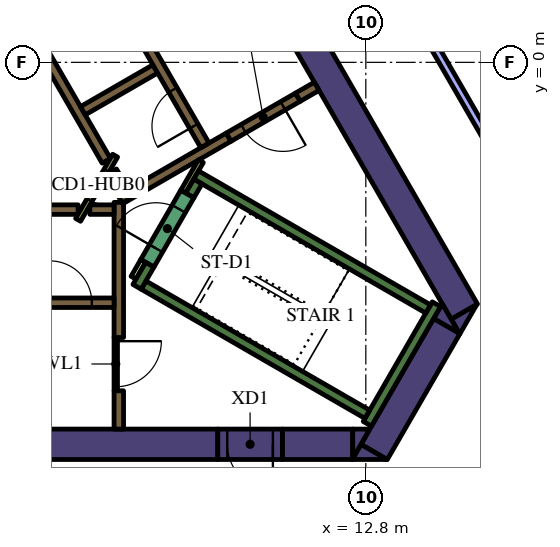
"""IFC4 building model, lengths in metres.
Left out: names, types, materials, properties, quantities, classifications, styles, units other than length and angle.
Written with IfcOpenShell. Run it as: python <this file> out.ifc"""

import sys

from ifc_helpers import new_model, si_unit, direction, frame, frame_2d, origin, place, context, subcontext, project, spatial, polyline, rectangle, outline, extrude, element, fill, save


model = new_model("IFC4")
c1 = context("Model", 3, precision=1e-05, world=origin(), true_north=direction((0.0, 1.0)))
c2 = subcontext(c1, "Body", "Model", "MODEL_VIEW")
j1 = project(units=[si_unit("LENGTHUNIT", "METRE"), si_unit("PLANEANGLEUNIT", "RADIAN")], contexts=[c1])
p1 = place(None, origin())
s1 = spatial("IfcSite", under=j1, at=p1, CompositionType="ELEMENT")
p2 = place(p1, origin())
s2 = spatial("IfcBuilding", under=s1, at=p2, CompositionType="ELEMENT")
p3 = place(p2, frame((0.0, 0.0, 192.0)))
s3 = spatial("IfcBuildingStorey", under=s2, at=p3, CompositionType="ELEMENT", Elevation=192.0)
p4 = place(p3, frame((9.129, 4.289, 0.0), z_axis=(0.0, 0.0, 1.0), x_axis=(0.499995742806, -0.866027861663, 0.0)))
e1 = element("IfcWall", 1, at=p4, inside=s3, PredefinedType="SOLIDWALL", context=c2, shape_type="SweptSolid", body=[
    extrude(rectangle(XDim=12.527, YDim=0.8, at=frame_2d((6.264, 0.0))), origin(), (0.0, 0.0, 1.0), 4.2),
])
p5 = place(p3, origin())
e2 = element("IfcWall", 2, at=p5, inside=s3, PredefinedType="SOLIDWALL", context=c2, shape_type="SweptSolid", body=[
    extrude(outline(polyline([(15.271, -7.15), (15.047, -6.762), (15.719, -6.374), (15.271, -7.15)])), origin(), (0.0, 0.0, 1.0), 4.2),
])
p6 = place(p3, frame((13.018, -10.252, 0.0), z_axis=(0.0, 0.0, 1.0), x_axis=(0.499984020225, 0.866034629516, 0.0)))
e3 = element("IfcWall", 3, at=p6, inside=s3, PredefinedType="SOLIDWALL", context=c2, shape_type="SweptSolid", body=[
    extrude(rectangle(XDim=3.824, YDim=0.8, at=frame_2d((1.912, 0.0))), origin(), (0.0, 0.0, 1.0), 4.2),
])
e4 = element("IfcWall", 4, at=p5, inside=s3, PredefinedType="SOLIDWALL", context=c2, shape_type="SweptSolid", body=[
    extrude(outline(polyline([(12.442, -10.45), (12.671, -10.053), (13.358, -10.45), (12.442, -10.45)])), origin(), (0.0, 0.0, 1.0), 4.2),
])
e5 = element("IfcWall", 5, at=p5, inside=s3, PredefinedType="SOLIDWALL", context=c2, shape_type="SweptSolid", body=[
    extrude(outline(polyline([(14.809, -6.35), (15.257, -7.126), (14.585, -6.738), (14.809, -6.35)])), origin(), (0.0, 0.0, 1.0), 4.2),
])
p7 = place(p3, frame((10.604, -10.05, 0.0), z_axis=(0.0, 0.0, 1.0), x_axis=(1.0, 0.0, 0.0)))
e6 = element("IfcWall", 6, at=p7, inside=s3, PredefinedType="SOLIDWALL", context=c2, shape_type="SweptSolid", body=[
    extrude(rectangle(XDim=1.849, YDim=0.8, at=frame_2d((0.925, 0.0))), origin(), (0.0, 0.0, 1.0), 4.2),
])
e7 = element("IfcWall", 7, at=p5, inside=s3, PredefinedType="SOLIDWALL", context=c2, shape_type="SweptSolid", body=[
    extrude(outline(polyline([(12.904, -9.65), (12.456, -10.426), (12.456, -9.65), (12.904, -9.65)])), origin(), (0.0, 0.0, 1.0), 4.2),
])
p8 = place(p3, frame((-13.378, -10.05, 0.0), z_axis=(0.0, 0.0, 1.0), x_axis=(1.0, 0.0, 0.0)))
e8 = element("IfcWall", 8, at=p8, inside=s3, PredefinedType="SOLIDWALL", context=c2, shape_type="SweptSolid", body=[
    extrude(rectangle(XDim=22.282, YDim=0.8, at=frame_2d((11.141, 0.0))), origin(), (0.0, 0.0, 1.0), 4.2),
])
p9 = place(p3, frame((12.84, -9.511, 0.0), z_axis=(0.0, 0.0, 1.0), x_axis=(0.499997733992, 0.866026712061, 0.0)))
e9 = element("IfcWall", 9, at=p9, inside=s3, PredefinedType="SOLIDWALL", context=c2, shape_type="SweptSolid", body=[
    extrude(rectangle(XDim=3.634, YDim=0.25, at=frame_2d((1.817, 0.0))), origin(), (0.0, 0.0, 1.0), 4.2),
])
p10 = place(p3, frame((12.84, -9.261, 0.0), z_axis=(0.0, 0.0, 1.0), x_axis=(-0.866013990052, 0.500019768644, 0.0)))
e10 = element("IfcWall", 10, at=p10, inside=s3, PredefinedType="SOLIDWALL", context=c2, shape_type="SweptSolid", body=[
    extrude(rectangle(XDim=6.8, YDim=0.25, at=frame_2d((3.4, 0.0))), origin(), (0.0, 0.0, 1.0), 4.2),
])
p11 = place(p3, frame((6.78, -5.906, 0.0), z_axis=(0.0, 0.0, 1.0), x_axis=(0.500223362819, 0.865896406789, 0.0)))
e11 = element("IfcWall", 11, at=p11, inside=s3, PredefinedType="SOLIDWALL", context=c2, shape_type="SweptSolid", body=[
    extrude(rectangle(XDim=0.675, YDim=0.25, at=frame_2d((0.337, 0.0))), origin(), (0.0, 0.0, 1.0), 4.2),
])
p12 = place(p3, frame((8.334, -2.964, 0.0), z_axis=(0.0, 0.0, 1.0), x_axis=(0.866016039709, -0.500016218704, 0.0)))
e12 = element("IfcWall", 12, at=p12, inside=s3, PredefinedType="SOLIDWALL", context=c2, shape_type="SweptSolid", body=[
    extrude(rectangle(XDim=7.05, YDim=0.25, at=frame_2d((3.525, 0.0))), origin(), (0.0, 0.0, 1.0), 4.2),
])
p13 = place(p3, frame((8.168, -3.503, 0.0), z_axis=(0.0, 0.0, 1.0), x_axis=(0.49972245349, 0.866185586049, 0.0)))
e13 = element("IfcWall", 13, at=p13, inside=s3, PredefinedType="SOLIDWALL", context=c2, shape_type="SweptSolid", body=[
    extrude(rectangle(XDim=0.425, YDim=0.25, at=frame_2d((0.212, 0.0))), origin(), (0.0, 0.0, 1.0), 4.2),
])
p14 = place(p3, frame((-5.259, -3.875, 0.0), z_axis=(0.0, 0.0, 1.0), x_axis=(1.0, 0.0, 0.0)))
e14 = element("IfcWall", 14, at=p14, inside=s3, PredefinedType="SOLIDWALL", context=c2, shape_type="SweptSolid", body=[
    extrude(rectangle(XDim=10.489, YDim=0.25, at=frame_2d((5.244, 0.0))), origin(), (0.0, 0.0, 1.0), 4.2),
])
p15 = place(p3, frame((6.3, -7.24, 0.0), z_axis=(0.0, 0.0, 1.0), x_axis=(0.0, 1.0, 0.0)))
e15 = element("IfcWall", 15, at=p15, inside=s3, PredefinedType="SOLIDWALL", context=c2, shape_type="SweptSolid", body=[
    extrude(rectangle(XDim=3.556, YDim=0.25, at=frame_2d((1.778, 0.0))), origin(), (0.0, 0.0, 1.0), 4.2),
])
p16 = place(p3, frame((6.3, -9.65, 0.0), z_axis=(0.0, 0.0, 1.0), x_axis=(0.0, 1.0, 0.0)))
e16 = element("IfcWall", 16, at=p16, inside=s3, PredefinedType="SOLIDWALL", context=c2, shape_type="SweptSolid", body=[
    extrude(rectangle(XDim=1.008, YDim=0.25, at=frame_2d((0.504, 0.0))), origin(), (0.0, 0.0, 1.0), 4.2),
])
p17 = place(p3, frame((5.538, -3.875, 0.0), z_axis=(0.0, 0.0, 1.0), x_axis=(1.0, 0.0, 0.0)))
e17 = element("IfcWall", 17, at=p17, inside=s3, PredefinedType="SOLIDWALL", context=c2, shape_type="SweptSolid", body=[
    extrude(rectangle(XDim=0.637, YDim=0.25, at=frame_2d((0.318, 0.0))), origin(), (0.0, 0.0, 1.0), 4.2),
])
p18 = place(p3, frame((9.19, -1.969, 0.0), z_axis=(0.0, 0.0, 1.0), x_axis=(-0.866057109641, -0.499945079824, 0.0)))
e18 = element("IfcWall", 18, at=p18, inside=s3, PredefinedType="SOLIDWALL", context=c2, shape_type="SweptSolid", body=[
    extrude(rectangle(XDim=3.291, YDim=0.25, at=frame_2d((1.646, 0.0))), origin(), (0.0, 0.0, 1.0), 4.2),
])
p19 = place(p3, frame((6.13, -2.867, 0.0), z_axis=(0.0, 0.0, 1.0), x_axis=(0.500160776593, -0.865932559475, 0.0)))
e19 = element("IfcWall", 19, at=p19, inside=s3, PredefinedType="SOLIDWALL", context=c2, shape_type="SweptSolid", body=[
    extrude(rectangle(XDim=0.627, YDim=0.25, at=frame_2d((0.313, 0.0))), origin(), (0.0, 0.0, 1.0), 4.2),
])
p20 = place(p3, frame((11.507, -0.631, 0.0), z_axis=(0.0, 0.0, 1.0), x_axis=(-0.866093731455, -0.499881634324, 0.0)))
e20 = element("IfcWall", 20, at=p20, inside=s3, PredefinedType="SOLIDWALL", context=c2, shape_type="SweptSolid", body=[
    extrude(rectangle(XDim=0.575, YDim=0.25, at=frame_2d((0.288, 0.0))), origin(), (0.0, 0.0, 1.0), 4.2),
])
p21 = place(p3, frame((5.97, -2.591, 0.0), z_axis=(0.0, 0.0, 1.0), x_axis=(-0.499994469932, 0.866028596547, 0.0)))
e21 = element("IfcWall", 21, at=p21, inside=s3, PredefinedType="SOLIDWALL", context=c2, shape_type="SweptSolid", body=[
    extrude(rectangle(XDim=10.488, YDim=0.25, at=frame_2d((5.244, 0.0))), origin(), (0.0, 0.0, 1.0), 4.2),
])
p22 = place(p3, frame((5.354, -1.274, 0.0), z_axis=(0.0, 0.0, 1.0), x_axis=(0.866008176907, 0.50002983664, 0.0)))
e22 = element("IfcWall", 22, at=p22, inside=s3, PredefinedType="SOLIDWALL", context=c2, shape_type="SweptSolid", body=[
    extrude(rectangle(XDim=2.2, YDim=0.25, at=frame_2d((1.1, 0.0))), origin(), (0.0, 0.0, 1.0), 4.2),
])
p23 = place(p3, frame((6.945, -5.222, 0.0), z_axis=(0.0, 0.0, 1.0), x_axis=(-0.499818422106, -0.866130212453, 0.0)))
e23 = element("IfcWall", 23, at=p23, inside=s3, PredefinedType="PARTITIONING", context=c2, shape_type="SweptSolid", body=[
    extrude(rectangle(XDim=0.514, YDim=0.15, at=frame_2d((0.257, 0.0))), origin(), (0.0, 0.0, 1.0), 3.1),
])
p24 = place(p3, frame((8.459, -2.599, 0.0), z_axis=(0.0, 0.0, 1.0), x_axis=(-0.500041054325, -0.866001699761, 0.0)))
e24 = element("IfcWall", 24, at=p24, inside=s3, PredefinedType="PARTITIONING", context=c2, shape_type="SweptSolid", body=[
    extrude(rectangle(XDim=0.929, YDim=0.15, at=frame_2d((0.464, 0.0))), origin(), (0.0, 0.0, 1.0), 4.2),
])
p25 = place(p3, frame((-6.175, -6.325, 0.0), z_axis=(0.0, 0.0, 1.0), x_axis=(1.0, 0.0, 0.0)))
e25 = element("IfcWall", 25, at=p25, inside=s3, PredefinedType="SOLIDWALL", context=c2, shape_type="SweptSolid", body=[
    extrude(rectangle(XDim=12.35, YDim=0.25, at=frame_2d((6.175, 0.0))), origin(), (0.0, 0.0, 1.0), 4.2),
])
p26 = place(p25, frame((0.585, 0.0, 0.0)))
e26 = element("IfcOpeningElement", 26, at=p26, cuts=e25, PredefinedType="OPENING", context=c2, shape_type="SweptSolid", body=[
    extrude(rectangle(XDim=1.1, YDim=2.1, at=frame_2d((0.55, 1.05))), frame((0.0, 0.135, 0.0), z_axis=(0.0, -1.0, 0.0), x_axis=(1.0, 0.0, 0.0)), (0.0, 0.0, 1.0), 0.27),
])
p27 = place(p25, frame((3.105, 0.0, 0.0)))
e27 = element("IfcOpeningElement", 27, at=p27, cuts=e25, PredefinedType="OPENING", context=c2, shape_type="SweptSolid", body=[
    extrude(rectangle(XDim=1.1, YDim=2.1, at=frame_2d((0.55, 1.05))), frame((0.0, 0.135, 0.0), z_axis=(0.0, -1.0, 0.0), x_axis=(1.0, 0.0, 0.0)), (0.0, 0.0, 1.0), 0.27),
])
p28 = place(p25, frame((5.625, 0.0, 0.0)))
e28 = element("IfcOpeningElement", 28, at=p28, cuts=e25, PredefinedType="OPENING", context=c2, shape_type="SweptSolid", body=[
    extrude(rectangle(XDim=1.1, YDim=2.1, at=frame_2d((0.55, 1.05))), frame((0.0, 0.135, 0.0), z_axis=(0.0, -1.0, 0.0), x_axis=(1.0, 0.0, 0.0)), (0.0, 0.0, 1.0), 0.27),
])
p29 = place(p25, frame((8.145, 0.0, 0.0)))
e29 = element("IfcOpeningElement", 29, at=p29, cuts=e25, PredefinedType="OPENING", context=c2, shape_type="SweptSolid", body=[
    extrude(rectangle(XDim=1.1, YDim=2.1, at=frame_2d((0.55, 1.05))), frame((0.0, 0.135, 0.0), z_axis=(0.0, -1.0, 0.0), x_axis=(1.0, 0.0, 0.0)), (0.0, 0.0, 1.0), 0.27),
])
p30 = place(p25, frame((10.665, 0.0, 0.0)))
e30 = element("IfcOpeningElement", 30, at=p30, cuts=e25, PredefinedType="OPENING", context=c2, shape_type="SweptSolid", body=[
    extrude(rectangle(XDim=1.1, YDim=2.1, at=frame_2d((0.55, 1.05))), frame((0.0, 0.135, 0.0), z_axis=(0.0, -1.0, 0.0), x_axis=(1.0, 0.0, 0.0)), (0.0, 0.0, 1.0), 0.27),
])
p31 = place(p3, frame((8.565, -2.185, 0.0), z_axis=(0.0, 0.0, 1.0), x_axis=(-0.499997954832, 0.866026584559, 0.0)))
e31 = element("IfcWall", 31, at=p31, inside=s3, PredefinedType="SOLIDWALL", context=c2, shape_type="SweptSolid", body=[
    extrude(rectangle(XDim=12.35, YDim=0.25, at=frame_2d((6.175, 0.0))), origin(), (0.0, 0.0, 1.0), 4.2),
])
p32 = place(p31, frame((0.585, 0.0, 0.0)))
e32 = element("IfcOpeningElement", 32, at=p32, cuts=e31, PredefinedType="OPENING", context=c2, shape_type="SweptSolid", body=[
    extrude(rectangle(XDim=1.1, YDim=2.1, at=frame_2d((0.55, 1.05))), frame((0.0, 0.135, 0.0), z_axis=(0.0, -1.0, 0.0), x_axis=(1.0, 0.0, 0.0)), (0.0, 0.0, 1.0), 0.27),
])
p33 = place(p3, frame((7.053, -5.284, 0.0), z_axis=(0.0, 0.0, 1.0), x_axis=(0.500078061341, 0.865980330357, 0.0)))
e33 = element("IfcWall", 33, at=p33, inside=s3, PredefinedType="SOLIDWALL", context=c2, shape_type="SweptSolid", body=[
    extrude(rectangle(XDim=2.1, YDim=0.4, at=frame_2d((1.05, 0.0))), origin(), (0.0, 0.0, 1.0), 4.2),
])
p34 = place(p33, frame((0.45, 0.0, 0.0)))
e34 = element("IfcOpeningElement", 34, at=p34, cuts=e33, PredefinedType="OPENING", context=c2, shape_type="SweptSolid", body=[
    extrude(rectangle(XDim=1.2, YDim=2.1, at=frame_2d((0.6, 1.05))), frame((0.0, 0.21, 0.0), z_axis=(0.0, -1.0, 0.0), x_axis=(1.0, 0.0, 0.0)), (0.0, 0.0, 1.0), 0.42),
])
p35 = place(p3, frame((6.203, -2.456, 0.0), z_axis=(0.0, 0.0, 1.0), x_axis=(-0.500043961785, -0.866000020948, 0.0)))
e35 = element("IfcWall", 35, at=p35, inside=s3, PredefinedType="PARTITIONING", context=c2, shape_type="SweptSolid", body=[
    extrude(rectangle(XDim=1.95, YDim=0.15, at=frame_2d((0.975, 0.0))), origin(), (0.0, 0.0, 1.0), 4.2),
])
p36 = place(p35, frame((0.45, 0.0, 0.0)))
e36 = element("IfcOpeningElement", 36, at=p36, cuts=e35, PredefinedType="OPENING", context=c2, shape_type="SweptSolid", body=[
    extrude(rectangle(XDim=0.9, YDim=2.1, at=frame_2d((0.45, 1.05))), frame((0.0, 0.085, 0.0), z_axis=(0.0, -1.0, 0.0), x_axis=(1.0, 0.0, 0.0)), (0.0, 0.0, 1.0), 0.17),
])
p37 = place(p3, frame((6.22, -7.237, 0.0), z_axis=(0.0, 0.0, 1.0), x_axis=(0.0, -1.0, 0.0)))
e37 = element("IfcWall", 37, at=p37, inside=s3, PredefinedType="PARTITIONING", context=c2, shape_type="SweptSolid", body=[
    extrude(rectangle(XDim=1.4, YDim=0.09, at=frame_2d((0.7, 0.0))), origin(), (0.0, 0.0, 1.0), 3.1),
])
p38 = place(p37, frame((0.1, 0.0, 0.0)))
e38 = element("IfcOpeningElement", 38, at=p38, cuts=e37, PredefinedType="OPENING", context=c2, shape_type="SweptSolid", body=[
    extrude(rectangle(XDim=1.2, YDim=2.1, at=frame_2d((0.6, 1.05))), frame((0.0, 0.055, 0.0), z_axis=(0.0, -1.0, 0.0), x_axis=(1.0, 0.0, 0.0)), (0.0, 0.0, 1.0), 0.11),
])
p39 = place(p3, frame((11.009, -0.919, 0.0), z_axis=(0.0, 0.0, 1.0), x_axis=(-0.866059744384, -0.49994051562, 0.0)))
e39 = element("IfcWall", 39, at=p39, inside=s3, PredefinedType="SOLIDWALL", context=c2, shape_type="SweptSolid", body=[
    extrude(rectangle(XDim=2.1, YDim=0.25, at=frame_2d((1.05, 0.0))), origin(), (0.0, 0.0, 1.0), 4.2),
])
p40 = place(p39, frame((0.45, 0.0, 0.0)))
e40 = element("IfcOpeningElement", 40, at=p40, cuts=e39, PredefinedType="OPENING", context=c2, shape_type="SweptSolid", body=[
    extrude(rectangle(XDim=1.2, YDim=2.1, at=frame_2d((0.6, 1.05))), frame((0.0, 0.135, 0.0), z_axis=(0.0, -1.0, 0.0), x_axis=(1.0, 0.0, 0.0)), (0.0, 0.0, 1.0), 0.27),
])
p41 = place(p3, frame((10.604, -10.05, 0.0), z_axis=(0.0, 0.0, 1.0), x_axis=(-1.0, 0.0, 0.0)))
e41 = element("IfcWall", 41, at=p41, inside=s3, PredefinedType="SOLIDWALL", context=c2, shape_type="SweptSolid", body=[
    extrude(rectangle(XDim=1.7, YDim=0.8, at=frame_2d((0.85, 0.0))), origin(), (0.0, 0.0, 1.0), 4.2),
])
p42 = place(p41, frame((0.25, 0.0, 0.0)))
e42 = element("IfcOpeningElement", 42, at=p42, cuts=e41, PredefinedType="OPENING", context=c2, shape_type="SweptSolid", body=[
    extrude(rectangle(XDim=1.2, YDim=2.1, at=frame_2d((0.6, 1.05))), frame((0.0, 0.41, 0.0), z_axis=(0.0, -1.0, 0.0), x_axis=(1.0, 0.0, 0.0)), (0.0, 0.0, 1.0), 0.82),
])
p43 = place(p3, frame((14.766, -12.824, 0.0), z_axis=(0.0, 0.0, 1.0), x_axis=(0.499983176524, 0.866035116605, 0.0)))
e43 = element("IfcWall", 43, at=p43, inside=s3, PredefinedType="PARTITIONING", context=c2, shape_type="SweptSolid", body=[
    extrude(rectangle(XDim=3.648, YDim=0.2, at=frame_2d((1.824, 0.0))), origin(), (0.0, 0.0, 1.0), 3.1),
])
p44 = place(p3, frame((15.219, 5.177, 0.0), z_axis=(0.0, 0.0, 1.0), x_axis=(0.472318506028, -0.881427948765, 0.0)))
e44 = element("IfcWall", 44, at=p44, inside=s3, PredefinedType="PARTITIONING", context=c2, shape_type="SweptSolid", body=[
    extrude(rectangle(XDim=6.419, YDim=0.15, at=frame_2d((3.21, 0.0))), origin(), (0.0, 0.0, 1.0), 3.1),
])
p45 = place(p44, frame((2.719, 0.0, 0.0)))
e45 = element("IfcOpeningElement", 45, at=p45, cuts=e44, PredefinedType="OPENING", context=c2, shape_type="SweptSolid", body=[
    extrude(rectangle(XDim=0.9, YDim=2.1, at=frame_2d((0.45, 1.05))), frame((0.0, 0.085, 0.0), z_axis=(0.0, -1.0, 0.0), x_axis=(1.0, 0.0, 0.0)), (0.0, 0.0, 1.0), 0.17),
])
p46 = place(p3, frame((18.489, -6.324, 0.0), z_axis=(0.0, 0.0, 1.0), x_axis=(-0.500006134913, 0.866021861762, 0.0)))
e46 = element("IfcWall", 46, at=p46, inside=s3, PredefinedType="PARTITIONING", context=c2, shape_type="SweptSolid", body=[
    extrude(rectangle(XDim=8.691, YDim=0.2, at=frame_2d((4.346, 0.0))), origin(), (0.0, 0.0, 1.0), 3.1),
])
p47 = place(p30, origin())
e47 = element("IfcDoor", 47, at=p47, inside=s3, OperationType="DOUBLE_DOOR_SLIDING", PredefinedType="DOOR", context=c2, shape_type="SweptSolid", body=[
    extrude(rectangle(XDim=1.1, YDim=2.1, at=frame_2d((0.55, 1.05))), frame((0.0, 0.025, 0.0), z_axis=(0.0, -1.0, 0.0), x_axis=(1.0, 0.0, 0.0)), (0.0, 0.0, 1.0), 0.05),
])
fill(e30, e47)
p48 = place(p32, origin())
e48 = element("IfcDoor", 48, at=p48, inside=s3, OperationType="DOUBLE_DOOR_SLIDING", PredefinedType="DOOR", context=c2, shape_type="SweptSolid", body=[
    extrude(rectangle(XDim=1.1, YDim=2.1, at=frame_2d((0.55, 1.05))), frame((0.0, 0.025, 0.0), z_axis=(0.0, -1.0, 0.0), x_axis=(1.0, 0.0, 0.0)), (0.0, 0.0, 1.0), 0.05),
])
fill(e32, e48)
p49 = place(p34, origin())
e49 = element("IfcDoor", 49, at=p49, inside=s3, OperationType="SINGLE_SWING_LEFT", PredefinedType="DOOR", context=c2, shape_type="SweptSolid", body=[
    extrude(rectangle(XDim=1.2, YDim=2.1, at=frame_2d((0.6, 1.05))), frame((0.0, 0.025, 0.0), z_axis=(0.0, -1.0, 0.0), x_axis=(1.0, 0.0, 0.0)), (0.0, 0.0, 1.0), 0.05),
])
fill(e34, e49)
p50 = place(p36, origin())
e50 = element("IfcDoor", 50, at=p50, inside=s3, OperationType="SINGLE_SWING_LEFT", PredefinedType="DOOR", context=c2, shape_type="SweptSolid", body=[
    extrude(rectangle(XDim=0.9, YDim=2.1, at=frame_2d((0.45, 1.05))), frame((0.0, 0.025, 0.0), z_axis=(0.0, -1.0, 0.0), x_axis=(1.0, 0.0, 0.0)), (0.0, 0.0, 1.0), 0.05),
])
fill(e36, e50)
p51 = place(p38, origin())
e51 = element("IfcDoor", 51, at=p51, inside=s3, OperationType="SINGLE_SWING_LEFT", PredefinedType="DOOR", context=c2, shape_type="SweptSolid", body=[
    extrude(rectangle(XDim=1.2, YDim=2.1, at=frame_2d((0.6, 1.05))), frame((0.0, 0.025, 0.0), z_axis=(0.0, -1.0, 0.0), x_axis=(1.0, 0.0, 0.0)), (0.0, 0.0, 1.0), 0.05),
])
fill(e38, e51)
p52 = place(p40, origin())
e52 = element("IfcDoor", 52, at=p52, inside=s3, OperationType="SINGLE_SWING_LEFT", PredefinedType="DOOR", context=c2, shape_type="SweptSolid", body=[
    extrude(rectangle(XDim=1.2, YDim=2.1, at=frame_2d((0.6, 1.05))), frame((0.0, 0.025, 0.0), z_axis=(0.0, -1.0, 0.0), x_axis=(1.0, 0.0, 0.0)), (0.0, 0.0, 1.0), 0.05),
])
fill(e40, e52)
p53 = place(p42, origin())
e53 = element("IfcDoor", 53, at=p53, inside=s3, OperationType="SINGLE_SWING_LEFT", PredefinedType="DOOR", context=c2, shape_type="SweptSolid", body=[
    extrude(rectangle(XDim=1.2, YDim=2.1, at=frame_2d((0.6, 1.05))), frame((0.0, 0.025, 0.0), z_axis=(0.0, -1.0, 0.0), x_axis=(1.0, 0.0, 0.0)), (0.0, 0.0, 1.0), 0.05),
])
fill(e42, e53)
save(model, sys.argv[1])
